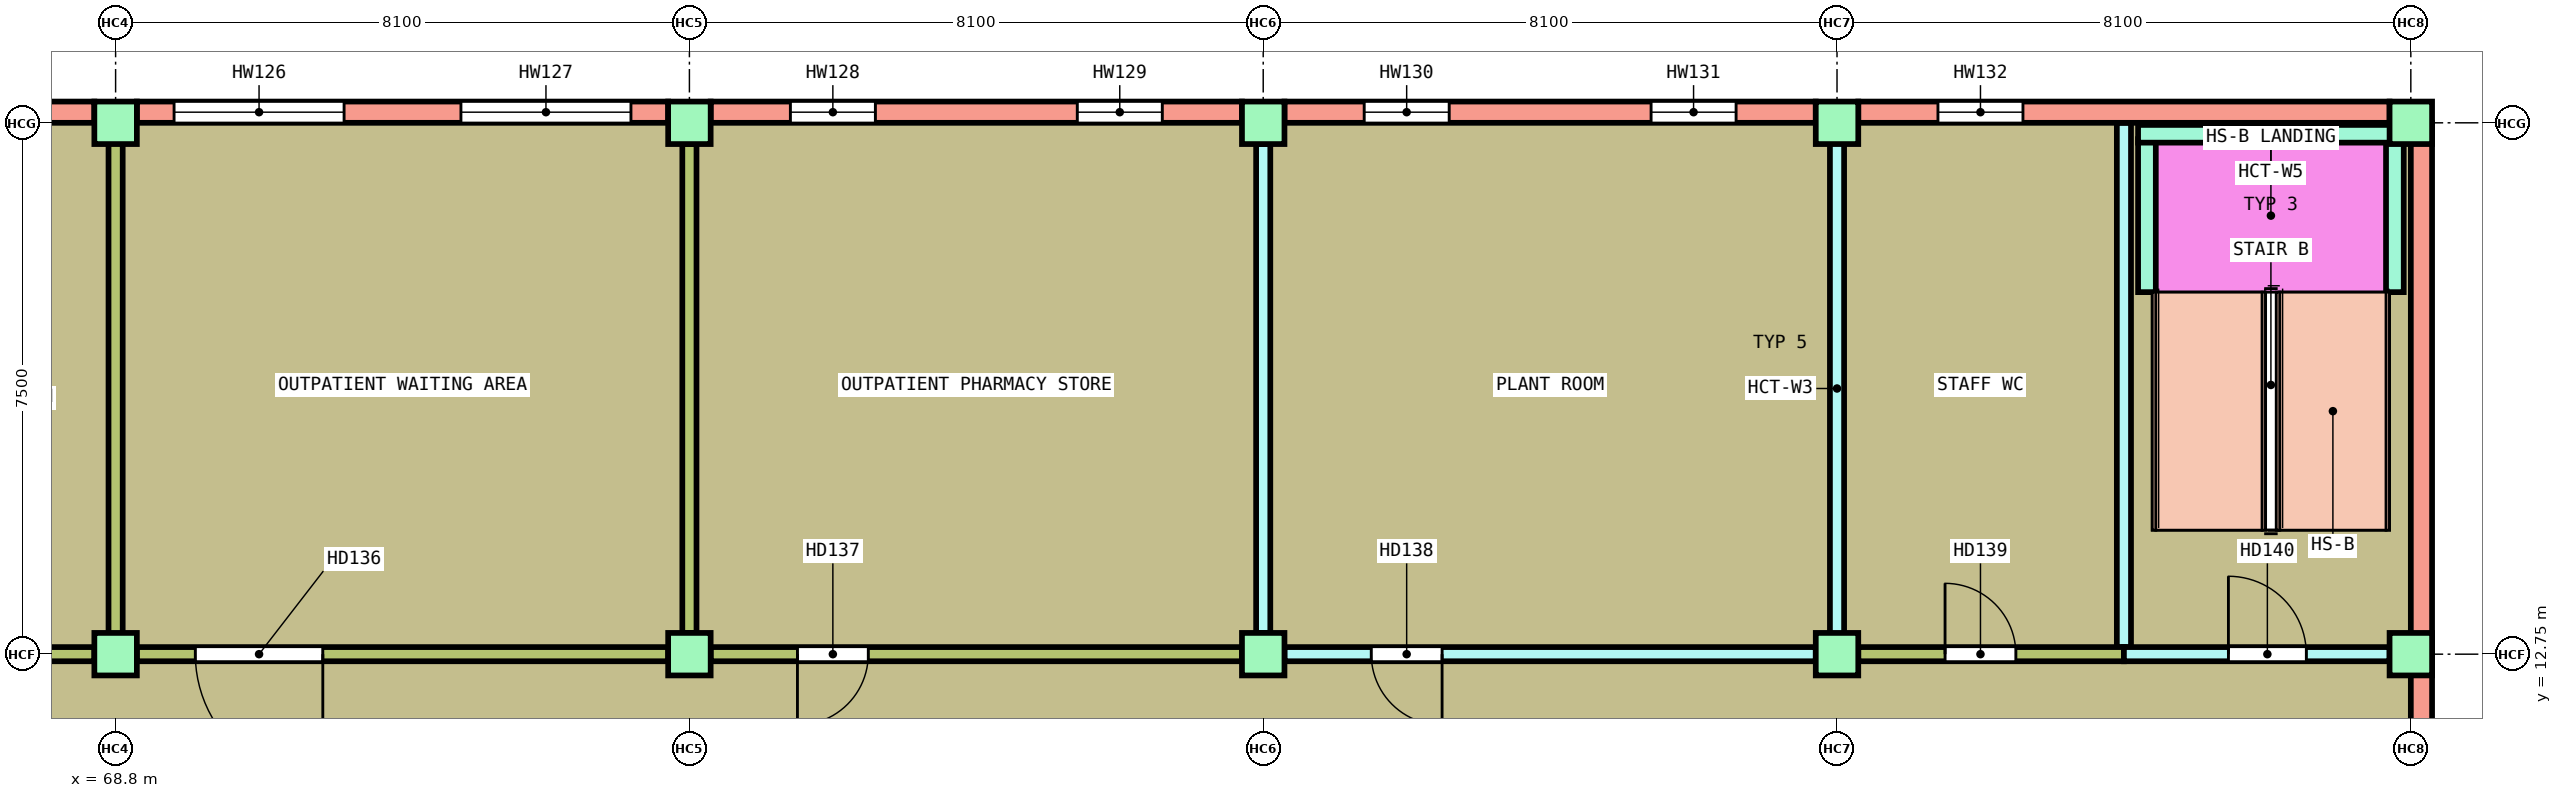
"""IFC4 building model, lengths in metres.
Left out: names, types, materials, properties, quantities, classifications, styles, units other than length and angle.
Written with IfcOpenShell. Run it as: python <this file> out.ifc"""

import sys

from ifc_helpers import new_model, si_unit, direction, frame, frame_2d, origin, origin_2d, place, context, subcontext, project, spatial, rectangle, extrude, element, fill, save


model = new_model("IFC4")
c1 = context("Model", 3, precision=1e-05, world=origin(), true_north=direction((0.0, 1.0)))
c2 = subcontext(c1, "Body", "Model", "MODEL_VIEW")
j1 = project(units=[si_unit("LENGTHUNIT", "METRE"), si_unit("PLANEANGLEUNIT", "RADIAN")], contexts=[c1])
p1 = place(None, origin())
s1 = spatial("IfcSite", under=j1, at=p1, CompositionType="ELEMENT")
p2 = place(p1, origin())
s2 = spatial("IfcBuilding", under=s1, at=p2, CompositionType="ELEMENT")
p3 = place(p2, frame((0.0, 0.0, 5.6)))
s3 = spatial("IfcBuildingStorey", under=s2, at=p3, CompositionType="ELEMENT", Elevation=5.6)
for number, where, z_axis, x_axis in (
    (1, (68.8, 12.75, 0.0), (0.0, 0.0, 1.0), (1.0, 0.0, 0.0)),
    (2, (76.9, 12.75, 0.0), (0.0, 0.0, 1.0), (1.0, 0.0, 0.0)),
    (3, (85.0, 12.75, 0.0), (0.0, 0.0, 1.0), (1.0, 0.0, 0.0)),
    (4, (93.1, 12.75, 0.0), (0.0, 0.0, 1.0), (1.0, 0.0, 0.0)),
    (5, (101.2, 12.75, 0.0), (0.0, 0.0, 1.0), (1.0, 0.0, 0.0)),
    (6, (68.8, 20.25, 0.0), (0.0, 0.0, 1.0), (1.0, 0.0, 0.0)),
    (7, (76.9, 20.25, 0.0), (0.0, 0.0, 1.0), (1.0, 0.0, 0.0)),
    (8, (85.0, 20.25, 0.0), (0.0, 0.0, 1.0), (1.0, 0.0, 0.0)),
    (9, (93.1, 20.25, 0.0), (0.0, 0.0, 1.0), (1.0, 0.0, 0.0)),
    (10, (101.2, 20.25, 0.0), (0.0, 0.0, 1.0), (1.0, 0.0, 0.0)),
):
    element("IfcColumn", number, at=place(p3, frame(where, z_axis=z_axis, x_axis=x_axis)), inside=s3, PredefinedType="COLUMN", context=c2, shape_type="SweptSolid", body=[
        extrude(rectangle(XDim=0.6, YDim=0.6, at=origin_2d()), origin(), (0.0, 0.0, 1.0), 4.6),
    ])
for number, where, z_axis, x_axis in (
    (11, (97.475, 17.86, 0.0), (0.0, 0.0, 1.0), (0.0, 1.0, 0.0)),
    (12, (100.975, 17.86, 0.0), (0.0, 0.0, 1.0), (0.0, 1.0, 0.0)),
):
    element("IfcWall", number, at=place(p3, frame(where, z_axis=z_axis, x_axis=x_axis)), inside=s3, PredefinedType="SOLIDWALL", context=c2, shape_type="SweptSolid", body=[
        extrude(rectangle(XDim=2.16, YDim=0.25, at=frame_2d((1.08, 0.0))), origin(), (0.0, 0.0, 1.0), 2.15),
    ])
p4 = place(p3, frame((97.35, 20.095, 0.0), z_axis=(0.0, 0.0, 1.0), x_axis=(1.0, 0.0, 0.0)))
e13 = element("IfcWall", 13, at=p4, inside=s3, PredefinedType="SOLIDWALL", context=c2, shape_type="SweptSolid", body=[
    extrude(rectangle(XDim=3.75, YDim=0.25, at=frame_2d((1.875, 0.0))), origin(), (0.0, 0.0, 1.0), 2.15),
])
p5 = place(p3, frame((76.9, 13.05, 0.0), z_axis=(0.0, 0.0, 1.0), x_axis=(0.0, 1.0, 0.0)))
e14 = element("IfcWall", 14, at=p5, inside=s3, PredefinedType="PARTITIONING", context=c2, shape_type="SweptSolid", body=[
    extrude(rectangle(XDim=6.9, YDim=0.2, at=frame_2d((3.45, 0.0))), origin(), (0.0, 0.0, 1.0), 3.8),
])
p6 = place(p3, frame((85.0, 13.05, 0.0), z_axis=(0.0, 0.0, 1.0), x_axis=(0.0, 1.0, 0.0)))
e15 = element("IfcWall", 15, at=p6, inside=s3, PredefinedType="SOLIDWALL", context=c2, shape_type="SweptSolid", body=[
    extrude(rectangle(XDim=6.9, YDim=0.2, at=frame_2d((3.45, 0.0))), origin(), (0.0, 0.0, 1.0), 3.8),
])
p7 = place(p3, frame((93.1, 12.75, 0.0), z_axis=(0.0, 0.0, 1.0), x_axis=(0.0, 1.0, 0.0)))
e16 = element("IfcWall", 16, at=p7, inside=s3, PredefinedType="SOLIDWALL", context=c2, shape_type="SweptSolid", body=[
    extrude(rectangle(XDim=7.5, YDim=0.2, at=frame_2d((3.75, 0.0))), origin(), (0.0, 0.0, 1.0), 3.8),
])
p8 = place(p3, frame((97.15, 12.85, 0.0), z_axis=(0.0, 0.0, 1.0), x_axis=(0.0, 1.0, 0.0)))
e17 = element("IfcWall", 17, at=p8, inside=s3, PredefinedType="SOLIDWALL", context=c2, shape_type="SweptSolid", body=[
    extrude(rectangle(XDim=7.4, YDim=0.2, at=frame_2d((3.7, 0.0))), origin(), (0.0, 0.0, 1.0), 3.8),
])
p9 = place(p3, frame((101.35, 20.25, 0.0), z_axis=(0.0, 0.0, 1.0), x_axis=(0.0, -1.0, 0.0)))
e18 = element("IfcWall", 18, at=p9, inside=s3, PredefinedType="SOLIDWALL", context=c2, shape_type="SweptSolid", body=[
    extrude(rectangle(XDim=40.5, YDim=0.3, at=frame_2d((20.25, 0.0))), origin(), (0.0, 0.0, 1.0), 3.8),
])
p10 = place(p9, frame((36.15, 0.0, 1.5)))
e19 = element("IfcOpeningElement", 19, at=p10, cuts=e18, PredefinedType="OPENING", context=c2, shape_type="SweptSolid", body=[
    extrude(rectangle(XDim=1.2, YDim=0.9, at=frame_2d((0.6, 0.45))), frame((0.0, 0.16, 0.0), z_axis=(0.0, -1.0, 0.0), x_axis=(1.0, 0.0, 0.0)), (0.0, 0.0, 1.0), 0.32),
])
p11 = place(p9, frame((24.225, 0.0, 0.9)))
e20 = element("IfcOpeningElement", 20, at=p11, cuts=e18, PredefinedType="OPENING", context=c2, shape_type="SweptSolid", body=[
    extrude(rectangle(XDim=1.8, YDim=1.8, at=frame_2d((0.9, 0.9))), frame((0.0, 0.16, 0.0), z_axis=(0.0, -1.0, 0.0), x_axis=(1.0, 0.0, 0.0)), (0.0, 0.0, 1.0), 0.32),
])
p12 = place(p9, frame((14.475, 0.0, 0.9)))
e21 = element("IfcOpeningElement", 21, at=p12, cuts=e18, PredefinedType="OPENING", context=c2, shape_type="SweptSolid", body=[
    extrude(rectangle(XDim=1.8, YDim=1.8, at=frame_2d((0.9, 0.9))), frame((0.0, 0.16, 0.0), z_axis=(0.0, -1.0, 0.0), x_axis=(1.0, 0.0, 0.0)), (0.0, 0.0, 1.0), 0.32),
])
p13 = place(p3, frame((68.8, 12.75, 0.0), z_axis=(0.0, 0.0, 1.0), x_axis=(0.0, 1.0, 0.0)))
e22 = element("IfcWall", 22, at=p13, inside=s3, PredefinedType="PARTITIONING", context=c2, shape_type="SweptSolid", body=[
    extrude(rectangle(XDim=7.5, YDim=0.2, at=frame_2d((3.75, 0.0))), origin(), (0.0, 0.0, 1.0), 3.8),
])
p14 = place(p3, frame((61.0, 12.75, 0.0), z_axis=(0.0, 0.0, 1.0), x_axis=(1.0, 0.0, 0.0)))
e23 = element("IfcWall", 23, at=p14, inside=s3, PredefinedType="PARTITIONING", context=c2, shape_type="SweptSolid", body=[
    extrude(rectangle(XDim=7.5, YDim=0.2, at=frame_2d((3.75, 0.0))), origin(), (0.0, 0.0, 1.0), 3.8),
])
p15 = place(p14, frame((1.225, 0.0, 0.0)))
e24 = element("IfcOpeningElement", 24, at=p15, cuts=e23, PredefinedType="OPENING", context=c2, shape_type="SweptSolid", body=[
    extrude(rectangle(XDim=1.0, YDim=2.1, at=frame_2d((0.5, 1.05))), frame((0.0, 0.11, 0.0), z_axis=(0.0, -1.0, 0.0), x_axis=(1.0, 0.0, 0.0)), (0.0, 0.0, 1.0), 0.22),
])
p16 = place(p14, frame((5.275, 0.0, 0.0)))
e25 = element("IfcOpeningElement", 25, at=p16, cuts=e23, PredefinedType="OPENING", context=c2, shape_type="SweptSolid", body=[
    extrude(rectangle(XDim=1.0, YDim=2.1, at=frame_2d((0.5, 1.05))), frame((0.0, 0.11, 0.0), z_axis=(0.0, -1.0, 0.0), x_axis=(1.0, 0.0, 0.0)), (0.0, 0.0, 1.0), 0.22),
])
p17 = place(p3, frame((69.1, 12.75, 0.0), z_axis=(0.0, 0.0, 1.0), x_axis=(1.0, 0.0, 0.0)))
e26 = element("IfcWall", 26, at=p17, inside=s3, PredefinedType="PARTITIONING", context=c2, shape_type="SweptSolid", body=[
    extrude(rectangle(XDim=7.5, YDim=0.2, at=frame_2d((3.75, 0.0))), origin(), (0.0, 0.0, 1.0), 3.8),
])
p18 = place(p17, frame((0.825, 0.0, 0.0)))
e27 = element("IfcOpeningElement", 27, at=p18, cuts=e26, PredefinedType="OPENING", context=c2, shape_type="SweptSolid", body=[
    extrude(rectangle(XDim=1.8, YDim=2.1, at=frame_2d((0.9, 1.05))), frame((0.0, 0.11, 0.0), z_axis=(0.0, -1.0, 0.0), x_axis=(1.0, 0.0, 0.0)), (0.0, 0.0, 1.0), 0.22),
])
p19 = place(p3, frame((77.2, 12.75, 0.0), z_axis=(0.0, 0.0, 1.0), x_axis=(1.0, 0.0, 0.0)))
e28 = element("IfcWall", 28, at=p19, inside=s3, PredefinedType="PARTITIONING", context=c2, shape_type="SweptSolid", body=[
    extrude(rectangle(XDim=7.5, YDim=0.2, at=frame_2d((3.75, 0.0))), origin(), (0.0, 0.0, 1.0), 3.8),
])
p20 = place(p19, frame((1.225, 0.0, 0.0)))
e29 = element("IfcOpeningElement", 29, at=p20, cuts=e28, PredefinedType="OPENING", context=c2, shape_type="SweptSolid", body=[
    extrude(rectangle(XDim=1.0, YDim=2.1, at=frame_2d((0.5, 1.05))), frame((0.0, 0.11, 0.0), z_axis=(0.0, -1.0, 0.0), x_axis=(1.0, 0.0, 0.0)), (0.0, 0.0, 1.0), 0.22),
])
p21 = place(p3, frame((85.3, 12.75, 0.0), z_axis=(0.0, 0.0, 1.0), x_axis=(1.0, 0.0, 0.0)))
e30 = element("IfcWall", 30, at=p21, inside=s3, PredefinedType="SOLIDWALL", context=c2, shape_type="SweptSolid", body=[
    extrude(rectangle(XDim=7.5, YDim=0.2, at=frame_2d((3.75, 0.0))), origin(), (0.0, 0.0, 1.0), 3.8),
])
p22 = place(p21, frame((1.225, 0.0, 0.0)))
e31 = element("IfcOpeningElement", 31, at=p22, cuts=e30, PredefinedType="OPENING", context=c2, shape_type="SweptSolid", body=[
    extrude(rectangle(XDim=1.0, YDim=2.1, at=frame_2d((0.5, 1.05))), frame((0.0, 0.11, 0.0), z_axis=(0.0, -1.0, 0.0), x_axis=(1.0, 0.0, 0.0)), (0.0, 0.0, 1.0), 0.22),
])
p23 = place(p3, frame((93.4, 12.75, 0.0), z_axis=(0.0, 0.0, 1.0), x_axis=(1.0, 0.0, 0.0)))
e32 = element("IfcWall", 32, at=p23, inside=s3, PredefinedType="PARTITIONING", context=c2, shape_type="SweptSolid", body=[
    extrude(rectangle(XDim=3.75, YDim=0.2, at=frame_2d((1.875, 0.0))), origin(), (0.0, 0.0, 1.0), 3.8),
])
p24 = place(p23, frame((1.225, 0.0, 0.0)))
e33 = element("IfcOpeningElement", 33, at=p24, cuts=e32, PredefinedType="OPENING", context=c2, shape_type="SweptSolid", body=[
    extrude(rectangle(XDim=1.0, YDim=2.1, at=frame_2d((0.5, 1.05))), frame((0.0, 0.11, 0.0), z_axis=(0.0, -1.0, 0.0), x_axis=(1.0, 0.0, 0.0)), (0.0, 0.0, 1.0), 0.22),
])
p25 = place(p3, frame((97.15, 12.75, 0.0), z_axis=(0.0, 0.0, 1.0), x_axis=(1.0, 0.0, 0.0)))
e34 = element("IfcWall", 34, at=p25, inside=s3, PredefinedType="SOLIDWALL", context=c2, shape_type="SweptSolid", body=[
    extrude(rectangle(XDim=3.75, YDim=0.2, at=frame_2d((1.875, 0.0))), origin(), (0.0, 0.0, 1.0), 3.8),
])
p26 = place(p25, frame((1.475, 0.0, 0.0)))
e35 = element("IfcOpeningElement", 35, at=p26, cuts=e34, PredefinedType="OPENING", context=c2, shape_type="SweptSolid", body=[
    extrude(rectangle(XDim=1.1, YDim=2.1, at=frame_2d((0.55, 1.05))), frame((0.0, 0.11, 0.0), z_axis=(0.0, -1.0, 0.0), x_axis=(1.0, 0.0, 0.0)), (0.0, 0.0, 1.0), 0.22),
])
p27 = place(p3, frame((61.0, 20.4, 0.0), z_axis=(0.0, 0.0, 1.0), x_axis=(1.0, 0.0, 0.0)))
e36 = element("IfcWall", 36, at=p27, inside=s3, PredefinedType="SOLIDWALL", context=c2, shape_type="SweptSolid", body=[
    extrude(rectangle(XDim=7.5, YDim=0.3, at=frame_2d((3.75, 0.0))), origin(), (0.0, 0.0, 1.0), 3.8),
])
p28 = place(p27, frame((0.825, 0.0, 0.9)))
e37 = element("IfcOpeningElement", 37, at=p28, cuts=e36, PredefinedType="OPENING", context=c2, shape_type="SweptSolid", body=[
    extrude(rectangle(XDim=1.8, YDim=1.8, at=frame_2d((0.9, 0.9))), frame((0.0, 0.16, 0.0), z_axis=(0.0, -1.0, 0.0), x_axis=(1.0, 0.0, 0.0)), (0.0, 0.0, 1.0), 0.32),
])
p29 = place(p27, frame((4.875, 0.0, 0.9)))
e38 = element("IfcOpeningElement", 38, at=p29, cuts=e36, PredefinedType="OPENING", context=c2, shape_type="SweptSolid", body=[
    extrude(rectangle(XDim=1.8, YDim=1.8, at=frame_2d((0.9, 0.9))), frame((0.0, 0.16, 0.0), z_axis=(0.0, -1.0, 0.0), x_axis=(1.0, 0.0, 0.0)), (0.0, 0.0, 1.0), 0.32),
])
p30 = place(p3, frame((69.1, 20.4, 0.0), z_axis=(0.0, 0.0, 1.0), x_axis=(1.0, 0.0, 0.0)))
e39 = element("IfcWall", 39, at=p30, inside=s3, PredefinedType="SOLIDWALL", context=c2, shape_type="SweptSolid", body=[
    extrude(rectangle(XDim=7.5, YDim=0.3, at=frame_2d((3.75, 0.0))), origin(), (0.0, 0.0, 1.0), 3.8),
])
p31 = place(p30, frame((0.525, 0.0, 0.3)))
e40 = element("IfcOpeningElement", 40, at=p31, cuts=e39, PredefinedType="OPENING", context=c2, shape_type="SweptSolid", body=[
    extrude(rectangle(XDim=2.4, YDim=2.4, at=frame_2d((1.2, 1.2))), frame((0.0, 0.16, 0.0), z_axis=(0.0, -1.0, 0.0), x_axis=(1.0, 0.0, 0.0)), (0.0, 0.0, 1.0), 0.32),
])
p32 = place(p30, frame((4.575, 0.0, 0.3)))
e41 = element("IfcOpeningElement", 41, at=p32, cuts=e39, PredefinedType="OPENING", context=c2, shape_type="SweptSolid", body=[
    extrude(rectangle(XDim=2.4, YDim=2.4, at=frame_2d((1.2, 1.2))), frame((0.0, 0.16, 0.0), z_axis=(0.0, -1.0, 0.0), x_axis=(1.0, 0.0, 0.0)), (0.0, 0.0, 1.0), 0.32),
])
p33 = place(p3, frame((77.2, 20.4, 0.0), z_axis=(0.0, 0.0, 1.0), x_axis=(1.0, 0.0, 0.0)))
e42 = element("IfcWall", 42, at=p33, inside=s3, PredefinedType="SOLIDWALL", context=c2, shape_type="SweptSolid", body=[
    extrude(rectangle(XDim=7.5, YDim=0.3, at=frame_2d((3.75, 0.0))), origin(), (0.0, 0.0, 1.0), 3.8),
])
p34 = place(p33, frame((1.125, 0.0, 1.5)))
e43 = element("IfcOpeningElement", 43, at=p34, cuts=e42, PredefinedType="OPENING", context=c2, shape_type="SweptSolid", body=[
    extrude(rectangle(XDim=1.2, YDim=0.9, at=frame_2d((0.6, 0.45))), frame((0.0, 0.16, 0.0), z_axis=(0.0, -1.0, 0.0), x_axis=(1.0, 0.0, 0.0)), (0.0, 0.0, 1.0), 0.32),
])
p35 = place(p33, frame((5.175, 0.0, 1.5)))
e44 = element("IfcOpeningElement", 44, at=p35, cuts=e42, PredefinedType="OPENING", context=c2, shape_type="SweptSolid", body=[
    extrude(rectangle(XDim=1.2, YDim=0.9, at=frame_2d((0.6, 0.45))), frame((0.0, 0.16, 0.0), z_axis=(0.0, -1.0, 0.0), x_axis=(1.0, 0.0, 0.0)), (0.0, 0.0, 1.0), 0.32),
])
p36 = place(p3, frame((85.3, 20.4, 0.0), z_axis=(0.0, 0.0, 1.0), x_axis=(1.0, 0.0, 0.0)))
e45 = element("IfcWall", 45, at=p36, inside=s3, PredefinedType="SOLIDWALL", context=c2, shape_type="SweptSolid", body=[
    extrude(rectangle(XDim=7.5, YDim=0.3, at=frame_2d((3.75, 0.0))), origin(), (0.0, 0.0, 1.0), 3.8),
])
p37 = place(p36, frame((1.125, 0.0, 1.5)))
e46 = element("IfcOpeningElement", 46, at=p37, cuts=e45, PredefinedType="OPENING", context=c2, shape_type="SweptSolid", body=[
    extrude(rectangle(XDim=1.2, YDim=0.9, at=frame_2d((0.6, 0.45))), frame((0.0, 0.16, 0.0), z_axis=(0.0, -1.0, 0.0), x_axis=(1.0, 0.0, 0.0)), (0.0, 0.0, 1.0), 0.32),
])
p38 = place(p36, frame((5.175, 0.0, 1.5)))
e47 = element("IfcOpeningElement", 47, at=p38, cuts=e45, PredefinedType="OPENING", context=c2, shape_type="SweptSolid", body=[
    extrude(rectangle(XDim=1.2, YDim=0.9, at=frame_2d((0.6, 0.45))), frame((0.0, 0.16, 0.0), z_axis=(0.0, -1.0, 0.0), x_axis=(1.0, 0.0, 0.0)), (0.0, 0.0, 1.0), 0.32),
])
p39 = place(p3, frame((93.4, 20.4, 0.0), z_axis=(0.0, 0.0, 1.0), x_axis=(1.0, 0.0, 0.0)))
e48 = element("IfcWall", 48, at=p39, inside=s3, PredefinedType="SOLIDWALL", context=c2, shape_type="SweptSolid", body=[
    extrude(rectangle(XDim=7.5, YDim=0.3, at=frame_2d((3.75, 0.0))), origin(), (0.0, 0.0, 1.0), 3.8),
])
p40 = place(p39, frame((1.125, 0.0, 1.5)))
e49 = element("IfcOpeningElement", 49, at=p40, cuts=e48, PredefinedType="OPENING", context=c2, shape_type="SweptSolid", body=[
    extrude(rectangle(XDim=1.2, YDim=0.9, at=frame_2d((0.6, 0.45))), frame((0.0, 0.16, 0.0), z_axis=(0.0, -1.0, 0.0), x_axis=(1.0, 0.0, 0.0)), (0.0, 0.0, 1.0), 0.32),
])
p41 = place(p18, origin())
e50 = element("IfcDoor", 50, at=p41, inside=s3, OperationType="DOUBLE_DOOR_SINGLE_SWING", PredefinedType="DOOR", context=c2, shape_type="SweptSolid", body=[
    extrude(rectangle(XDim=1.8, YDim=2.1, at=frame_2d((0.9, 1.05))), frame((0.0, 0.025, 0.0), z_axis=(0.0, -1.0, 0.0), x_axis=(1.0, 0.0, 0.0)), (0.0, 0.0, 1.0), 0.05),
])
fill(e27, e50)
p42 = place(p20, origin())
e51 = element("IfcDoor", 51, at=p42, inside=s3, OperationType="SINGLE_SWING_RIGHT", PredefinedType="DOOR", context=c2, shape_type="SweptSolid", body=[
    extrude(rectangle(XDim=1.0, YDim=2.1, at=frame_2d((0.5, 1.05))), frame((0.0, 0.025, 0.0), z_axis=(0.0, -1.0, 0.0), x_axis=(1.0, 0.0, 0.0)), (0.0, 0.0, 1.0), 0.05),
])
fill(e29, e51)
p43 = place(p22, origin())
e52 = element("IfcDoor", 52, at=p43, inside=s3, OperationType="SINGLE_SWING_LEFT", PredefinedType="DOOR", context=c2, shape_type="SweptSolid", body=[
    extrude(rectangle(XDim=1.0, YDim=2.1, at=frame_2d((0.5, 1.05))), frame((0.0, 0.025, 0.0), z_axis=(0.0, -1.0, 0.0), x_axis=(1.0, 0.0, 0.0)), (0.0, 0.0, 1.0), 0.05),
])
fill(e31, e52)
p44 = place(p24, origin())
e53 = element("IfcDoor", 53, at=p44, inside=s3, OperationType="SINGLE_SWING_RIGHT", PredefinedType="DOOR", context=c2, shape_type="SweptSolid", body=[
    extrude(rectangle(XDim=1.0, YDim=2.1, at=frame_2d((0.5, 1.05))), frame((0.0, 0.025, 0.0), z_axis=(0.0, -1.0, 0.0), x_axis=(1.0, 0.0, 0.0)), (0.0, 0.0, 1.0), 0.05),
])
fill(e33, e53)
p45 = place(p26, origin())
e54 = element("IfcDoor", 54, at=p45, inside=s3, OperationType="SINGLE_SWING_LEFT", PredefinedType="DOOR", context=c2, shape_type="SweptSolid", body=[
    extrude(rectangle(XDim=1.1, YDim=2.1, at=frame_2d((0.55, 1.05))), frame((0.0, 0.025, 0.0), z_axis=(0.0, -1.0, 0.0), x_axis=(1.0, 0.0, 0.0)), (0.0, 0.0, 1.0), 0.05),
])
fill(e35, e54)
p46 = place(p31, origin())
e55 = element("IfcWindow", 55, at=p46, inside=s3, PartitioningType="DOUBLE_PANEL_VERTICAL", PredefinedType="WINDOW", context=c2, shape_type="SweptSolid", body=[
    extrude(rectangle(XDim=2.4, YDim=2.4, at=frame_2d((1.2, 1.2))), frame((0.0, 0.03, 0.0), z_axis=(0.0, -1.0, 0.0), x_axis=(1.0, 0.0, 0.0)), (0.0, 0.0, 1.0), 0.06),
])
fill(e40, e55)
p47 = place(p32, origin())
e56 = element("IfcWindow", 56, at=p47, inside=s3, PartitioningType="DOUBLE_PANEL_VERTICAL", PredefinedType="WINDOW", context=c2, shape_type="SweptSolid", body=[
    extrude(rectangle(XDim=2.4, YDim=2.4, at=frame_2d((1.2, 1.2))), frame((0.0, 0.03, 0.0), z_axis=(0.0, -1.0, 0.0), x_axis=(1.0, 0.0, 0.0)), (0.0, 0.0, 1.0), 0.06),
])
fill(e41, e56)
p48 = place(p34, origin())
e57 = element("IfcWindow", 57, at=p48, inside=s3, PartitioningType="SINGLE_PANEL", PredefinedType="WINDOW", context=c2, shape_type="SweptSolid", body=[
    extrude(rectangle(XDim=1.2, YDim=0.9, at=frame_2d((0.6, 0.45))), frame((0.0, 0.03, 0.0), z_axis=(0.0, -1.0, 0.0), x_axis=(1.0, 0.0, 0.0)), (0.0, 0.0, 1.0), 0.06),
])
fill(e43, e57)
p49 = place(p35, origin())
e58 = element("IfcWindow", 58, at=p49, inside=s3, PartitioningType="SINGLE_PANEL", PredefinedType="WINDOW", context=c2, shape_type="SweptSolid", body=[
    extrude(rectangle(XDim=1.2, YDim=0.9, at=frame_2d((0.6, 0.45))), frame((0.0, 0.03, 0.0), z_axis=(0.0, -1.0, 0.0), x_axis=(1.0, 0.0, 0.0)), (0.0, 0.0, 1.0), 0.06),
])
fill(e44, e58)
p50 = place(p37, origin())
e59 = element("IfcWindow", 59, at=p50, inside=s3, PartitioningType="SINGLE_PANEL", PredefinedType="WINDOW", context=c2, shape_type="SweptSolid", body=[
    extrude(rectangle(XDim=1.2, YDim=0.9, at=frame_2d((0.6, 0.45))), frame((0.0, 0.03, 0.0), z_axis=(0.0, -1.0, 0.0), x_axis=(1.0, 0.0, 0.0)), (0.0, 0.0, 1.0), 0.06),
])
fill(e46, e59)
p51 = place(p38, origin())
e60 = element("IfcWindow", 60, at=p51, inside=s3, PartitioningType="SINGLE_PANEL", PredefinedType="WINDOW", context=c2, shape_type="SweptSolid", body=[
    extrude(rectangle(XDim=1.2, YDim=0.9, at=frame_2d((0.6, 0.45))), frame((0.0, 0.03, 0.0), z_axis=(0.0, -1.0, 0.0), x_axis=(1.0, 0.0, 0.0)), (0.0, 0.0, 1.0), 0.06),
])
fill(e47, e60)
p52 = place(p40, origin())
e61 = element("IfcWindow", 61, at=p52, inside=s3, PartitioningType="SINGLE_PANEL", PredefinedType="WINDOW", context=c2, shape_type="SweptSolid", body=[
    extrude(rectangle(XDim=1.2, YDim=0.9, at=frame_2d((0.6, 0.45))), frame((0.0, 0.03, 0.0), z_axis=(0.0, -1.0, 0.0), x_axis=(1.0, 0.0, 0.0)), (0.0, 0.0, 1.0), 0.06),
])
fill(e49, e61)
save(model, sys.argv[1])
